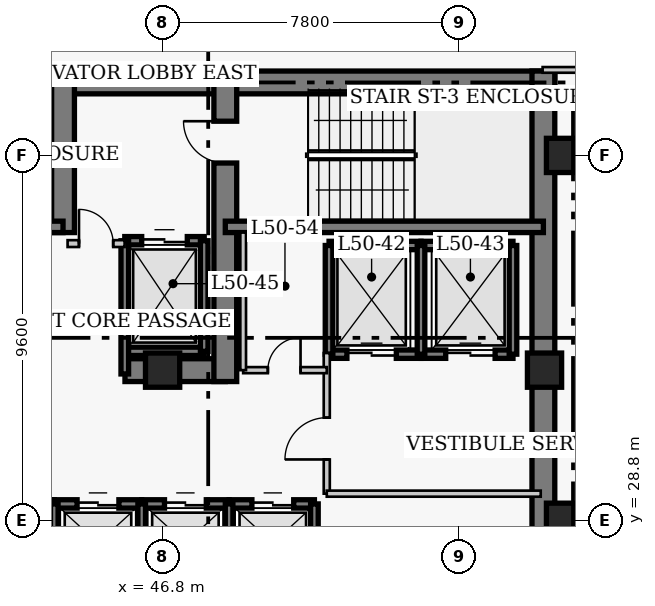
"""IFC4 building model, lengths in metres.
Left out: names, types, materials, properties, quantities, classifications, styles, units other than length and angle.
Written with IfcOpenShell. Run it as: python <this file> out.ifc"""

import sys

from ifc_helpers import new_model, si_unit, direction, frame, frame_2d, origin, origin_2d, place, context, subcontext, project, spatial, rectangle, extrude, element, fill, save


model = new_model("IFC4")
c1 = context("Model", 3, precision=1e-05, world=origin(), true_north=direction((0.0, 1.0)))
c2 = subcontext(c1, "Body", "Model", "MODEL_VIEW")
j1 = project(units=[si_unit("LENGTHUNIT", "METRE"), si_unit("PLANEANGLEUNIT", "RADIAN")], contexts=[c1])
p1 = place(None, origin())
s1 = spatial("IfcSite", under=j1, at=p1, CompositionType="ELEMENT")
p2 = place(p1, origin())
s2 = spatial("IfcBuilding", under=s1, at=p2, CompositionType="ELEMENT")
p3 = place(p2, frame((0.0, 0.0, 200.7)))
s3 = spatial("IfcBuildingStorey", under=s2, at=p3, CompositionType="ELEMENT", Elevation=200.7)
p4 = place(p3, frame((35.85, 40.32, 0.0), z_axis=(0.0, 0.0, 1.0), x_axis=(1.0, 0.0, 0.0)))
e1 = element("IfcWall", 1, at=p4, inside=s3, PredefinedType="SHEAR", context=c2, shape_type="SweptSolid", body=[
    extrude(rectangle(XDim=12.6, YDim=0.6, at=frame_2d((6.3, 0.0))), origin(), (0.0, 0.0, 1.0), 3.9),
])
p5 = place(p3, frame((48.45, 40.32, 0.0), z_axis=(0.0, 0.0, 1.0), x_axis=(1.0, 0.0, 0.0)))
e2 = element("IfcWall", 2, at=p5, inside=s3, PredefinedType="SHEAR", context=c2, shape_type="SweptSolid", body=[
    extrude(rectangle(XDim=8.67, YDim=0.6, at=frame_2d((4.335, 0.0))), origin(), (0.0, 0.0, 1.0), 3.9),
])
p6 = place(p3, frame((56.82, 27.05, 0.0), z_axis=(0.0, 0.0, 1.0), x_axis=(0.0, 1.0, 0.0)))
e3 = element("IfcWall", 3, at=p6, inside=s3, PredefinedType="SHEAR", context=c2, shape_type="SweptSolid", body=[
    extrude(rectangle(XDim=13.57, YDim=0.6, at=frame_2d((6.785, 0.0))), origin(), (0.0, 0.0, 1.0), 3.9),
])
p7 = place(p3, frame((45.81, 32.75, 0.0), z_axis=(0.0, 0.0, 1.0), x_axis=(1.0, 0.0, 0.0)))
e4 = element("IfcWall", 4, at=p7, inside=s3, PredefinedType="SHEAR", context=c2, shape_type="SweptSolid", body=[
    extrude(rectangle(XDim=2.64, YDim=0.6, at=frame_2d((1.32, 0.0))), origin(), (0.0, 0.0, 1.0), 3.9),
])
p8 = place(p3, frame((44.18, 36.37, 0.0), z_axis=(0.0, 0.0, 1.0), x_axis=(0.0, 1.0, 0.0)))
e5 = element("IfcWall", 5, at=p8, inside=s3, PredefinedType="SHEAR", context=c2, shape_type="SweptSolid", body=[
    extrude(rectangle(XDim=3.95, YDim=0.6, at=frame_2d((1.975, 0.0))), origin(), (0.0, 0.0, 1.0), 3.9),
])
p9 = place(p3, frame((48.45, 32.45, 0.0), z_axis=(0.0, 0.0, 1.0), x_axis=(0.0, 1.0, 0.0)))
e6 = element("IfcWall", 6, at=p9, inside=s3, PredefinedType="SHEAR", context=c2, shape_type="SweptSolid", body=[
    extrude(rectangle(XDim=7.87, YDim=0.6, at=frame_2d((3.935, 0.0))), origin(), (0.0, 0.0, 1.0), 3.9),
])
p10 = place(p9, frame((5.75, 0.0, 0.0)))
e7 = element("IfcOpeningElement", 7, at=p10, cuts=e6, PredefinedType="OPENING", context=c2, shape_type="SweptSolid", body=[
    extrude(rectangle(XDim=1.1, YDim=2.15, at=frame_2d((0.55, 1.075))), frame((0.0, 0.31, 0.0), z_axis=(0.0, -1.0, 0.0), x_axis=(1.0, 0.0, 0.0)), (0.0, 0.0, 1.0), 0.62),
])
p11 = place(p3, frame((35.85, 36.52, 0.0), z_axis=(0.0, 0.0, 1.0), x_axis=(1.0, 0.0, 0.0)))
e8 = element("IfcWall", 8, at=p11, inside=s3, PredefinedType="SHEAR", context=c2, shape_type="SweptSolid", body=[
    extrude(rectangle(XDim=8.33, YDim=0.3, at=frame_2d((4.165, 0.0))), origin(), (0.0, 0.0, 1.0), 3.9),
])
p12 = place(p3, frame((48.45, 36.52, 0.0), z_axis=(0.0, 0.0, 1.0), x_axis=(1.0, 0.0, 0.0)))
e9 = element("IfcWall", 9, at=p12, inside=s3, PredefinedType="SHEAR", context=c2, shape_type="SweptSolid", body=[
    extrude(rectangle(XDim=8.37, YDim=0.3, at=frame_2d((4.185, 0.0))), origin(), (0.0, 0.0, 1.0), 3.9),
])
for number, where, z_axis, x_axis in (
    (10, (57.35, 28.8, 0.0), (0.0, 0.0, 1.0), (1.0, 0.0, 0.0)),
    (11, (57.35, 38.4, 0.0), (0.0, 0.0, 1.0), (1.0, 0.0, 0.0)),
    (12, (46.8, 32.75, 0.0), (0.0, 0.0, 1.0), (1.0, 0.0, 0.0)),
    (13, (56.85, 32.75, 0.0), (0.0, 0.0, 1.0), (1.0, 0.0, 0.0)),
):
    element("IfcColumn", number, at=place(p3, frame(where, z_axis=z_axis, x_axis=x_axis)), inside=s3, PredefinedType="COLUMN", context=c2, shape_type="SweptSolid", body=[
        extrude(rectangle(XDim=0.9, YDim=0.9, at=origin_2d()), origin(), (0.0, 0.0, 1.0), 3.9),
    ])
p13 = place(p3, frame((41.705, 29.23, 0.0), z_axis=(0.0, 0.0, 1.0), x_axis=(1.0, 0.0, 0.0)))
e14 = element("IfcWall", 14, at=p13, inside=s3, PredefinedType="SHEAR", context=c2, shape_type="SweptSolid", body=[
    extrude(rectangle(XDim=2.245, YDim=0.22, at=frame_2d((1.123, 0.0))), origin(), (0.0, 0.0, 1.0), 3.9),
])
p14 = place(p13, frame((0.545, 0.0, 0.0)))
e15 = element("IfcOpeningElement", 15, at=p14, cuts=e14, PredefinedType="OPENING", context=c2, shape_type="SweptSolid", body=[
    extrude(rectangle(XDim=1.1, YDim=2.15, at=frame_2d((0.55, 1.075))), frame((0.0, 0.12, 0.0), z_axis=(0.0, -1.0, 0.0), x_axis=(1.0, 0.0, 0.0)), (0.0, 0.0, 1.0), 0.24),
])
p15 = place(p3, frame((43.95, 29.23, 0.0), z_axis=(0.0, 0.0, 1.0), x_axis=(1.0, 0.0, 0.0)))
e16 = element("IfcWall", 16, at=p15, inside=s3, PredefinedType="SHEAR", context=c2, shape_type="SweptSolid", body=[
    extrude(rectangle(XDim=2.3, YDim=0.22, at=frame_2d((1.15, 0.0))), origin(), (0.0, 0.0, 1.0), 3.9),
])
p16 = place(p15, frame((0.6, 0.0, 0.0)))
e17 = element("IfcOpeningElement", 17, at=p16, cuts=e16, PredefinedType="OPENING", context=c2, shape_type="SweptSolid", body=[
    extrude(rectangle(XDim=1.1, YDim=2.15, at=frame_2d((0.55, 1.075))), frame((0.0, 0.12, 0.0), z_axis=(0.0, -1.0, 0.0), x_axis=(1.0, 0.0, 0.0)), (0.0, 0.0, 1.0), 0.24),
])
p17 = place(p3, frame((43.95, 27.17, 0.0), z_axis=(0.0, 0.0, 1.0), x_axis=(0.0, 1.0, 0.0)))
e18 = element("IfcWall", 18, at=p17, inside=s3, PredefinedType="SHEAR", context=c2, shape_type="SweptSolid", body=[
    extrude(rectangle(XDim=2.06, YDim=0.2, at=frame_2d((1.03, 0.0))), origin(), (0.0, 0.0, 1.0), 3.9),
])
p18 = place(p3, frame((46.25, 29.23, 0.0), z_axis=(0.0, 0.0, 1.0), x_axis=(1.0, 0.0, 0.0)))
e19 = element("IfcWall", 19, at=p18, inside=s3, PredefinedType="SHEAR", context=c2, shape_type="SweptSolid", body=[
    extrude(rectangle(XDim=2.3, YDim=0.22, at=frame_2d((1.15, 0.0))), origin(), (0.0, 0.0, 1.0), 3.9),
])
p19 = place(p18, frame((0.6, 0.0, 0.0)))
e20 = element("IfcOpeningElement", 20, at=p19, cuts=e19, PredefinedType="OPENING", context=c2, shape_type="SweptSolid", body=[
    extrude(rectangle(XDim=1.1, YDim=2.15, at=frame_2d((0.55, 1.075))), frame((0.0, 0.12, 0.0), z_axis=(0.0, -1.0, 0.0), x_axis=(1.0, 0.0, 0.0)), (0.0, 0.0, 1.0), 0.24),
])
p20 = place(p3, frame((46.25, 27.17, 0.0), z_axis=(0.0, 0.0, 1.0), x_axis=(0.0, 1.0, 0.0)))
e21 = element("IfcWall", 21, at=p20, inside=s3, PredefinedType="SHEAR", context=c2, shape_type="SweptSolid", body=[
    extrude(rectangle(XDim=2.06, YDim=0.2, at=frame_2d((1.03, 0.0))), origin(), (0.0, 0.0, 1.0), 3.9),
])
p21 = place(p3, frame((48.55, 29.23, 0.0), z_axis=(0.0, 0.0, 1.0), x_axis=(1.0, 0.0, 0.0)))
e22 = element("IfcWall", 22, at=p21, inside=s3, PredefinedType="SHEAR", context=c2, shape_type="SweptSolid", body=[
    extrude(rectangle(XDim=2.245, YDim=0.22, at=frame_2d((1.123, 0.0))), origin(), (0.0, 0.0, 1.0), 3.9),
])
p22 = place(p21, frame((0.6, 0.0, 0.0)))
e23 = element("IfcOpeningElement", 23, at=p22, cuts=e22, PredefinedType="OPENING", context=c2, shape_type="SweptSolid", body=[
    extrude(rectangle(XDim=1.1, YDim=2.15, at=frame_2d((0.55, 1.075))), frame((0.0, 0.12, 0.0), z_axis=(0.0, -1.0, 0.0), x_axis=(1.0, 0.0, 0.0)), (0.0, 0.0, 1.0), 0.24),
])
for number, where, z_axis, x_axis in (
    (24, (48.55, 27.17, 0.0), (0.0, 0.0, 1.0), (0.0, 1.0, 0.0)),
    (25, (50.795, 27.17, 0.0), (0.0, 0.0, 1.0), (0.0, 1.0, 0.0)),
):
    element("IfcWall", number, at=place(p3, frame(where, z_axis=z_axis, x_axis=x_axis)), inside=s3, PredefinedType="SHEAR", context=c2, shape_type="SweptSolid", body=[
        extrude(rectangle(XDim=2.06, YDim=0.2, at=frame_2d((1.03, 0.0))), origin(), (0.0, 0.0, 1.0), 3.9),
    ])
p23 = place(p3, frame((51.18, 36.03, 0.0), z_axis=(0.0, 0.0, 1.0), x_axis=(1.0, 0.0, 0.0)))
e26 = element("IfcWall", 26, at=p23, inside=s3, PredefinedType="SHEAR", context=c2, shape_type="SweptSolid", body=[
    extrude(rectangle(XDim=2.42, YDim=0.22, at=frame_2d((1.21, 0.0))), origin(), (0.0, 0.0, 1.0), 3.9),
])
p24 = place(p3, frame((51.18, 33.17, 0.0), z_axis=(0.0, 0.0, 1.0), x_axis=(1.0, 0.0, 0.0)))
e27 = element("IfcWall", 27, at=p24, inside=s3, PredefinedType="SHEAR", context=c2, shape_type="SweptSolid", body=[
    extrude(rectangle(XDim=2.42, YDim=0.22, at=frame_2d((1.21, 0.0))), origin(), (0.0, 0.0, 1.0), 3.9),
])
p25 = place(p24, frame((0.47, 0.0, 0.0)))
e28 = element("IfcOpeningElement", 28, at=p25, cuts=e27, PredefinedType="OPENING", context=c2, shape_type="SweptSolid", body=[
    extrude(rectangle(XDim=1.3, YDim=2.15, at=frame_2d((0.65, 1.075))), frame((0.0, 0.12, 0.0), z_axis=(0.0, -1.0, 0.0), x_axis=(1.0, 0.0, 0.0)), (0.0, 0.0, 1.0), 0.24),
])
p26 = place(p3, frame((51.18, 33.17, 0.0), z_axis=(0.0, 0.0, 1.0), x_axis=(0.0, 1.0, 0.0)))
e29 = element("IfcWall", 29, at=p26, inside=s3, PredefinedType="SHEAR", context=c2, shape_type="SweptSolid", body=[
    extrude(rectangle(XDim=2.86, YDim=0.2, at=frame_2d((1.43, 0.0))), origin(), (0.0, 0.0, 1.0), 3.9),
])
p27 = place(p3, frame((53.6, 36.03, 0.0), z_axis=(0.0, 0.0, 1.0), x_axis=(1.0, 0.0, 0.0)))
e30 = element("IfcWall", 30, at=p27, inside=s3, PredefinedType="SHEAR", context=c2, shape_type="SweptSolid", body=[
    extrude(rectangle(XDim=2.42, YDim=0.22, at=frame_2d((1.21, 0.0))), origin(), (0.0, 0.0, 1.0), 3.9),
])
p28 = place(p3, frame((53.6, 33.17, 0.0), z_axis=(0.0, 0.0, 1.0), x_axis=(1.0, 0.0, 0.0)))
e31 = element("IfcWall", 31, at=p28, inside=s3, PredefinedType="SHEAR", context=c2, shape_type="SweptSolid", body=[
    extrude(rectangle(XDim=2.42, YDim=0.22, at=frame_2d((1.21, 0.0))), origin(), (0.0, 0.0, 1.0), 3.9),
])
p29 = place(p28, frame((0.65, 0.0, 0.0)))
e32 = element("IfcOpeningElement", 32, at=p29, cuts=e31, PredefinedType="OPENING", context=c2, shape_type="SweptSolid", body=[
    extrude(rectangle(XDim=1.3, YDim=2.15, at=frame_2d((0.65, 1.075))), frame((0.0, 0.12, 0.0), z_axis=(0.0, -1.0, 0.0), x_axis=(1.0, 0.0, 0.0)), (0.0, 0.0, 1.0), 0.24),
])
for number, where, z_axis, x_axis in (
    (33, (53.6, 33.17, 0.0), (0.0, 0.0, 1.0), (0.0, 1.0, 0.0)),
    (34, (56.02, 33.17, 0.0), (0.0, 0.0, 1.0), (0.0, 1.0, 0.0)),
):
    element("IfcWall", number, at=place(p3, frame(where, z_axis=z_axis, x_axis=x_axis)), inside=s3, PredefinedType="SHEAR", context=c2, shape_type="SweptSolid", body=[
        extrude(rectangle(XDim=2.86, YDim=0.2, at=frame_2d((1.43, 0.0))), origin(), (0.0, 0.0, 1.0), 3.9),
    ])
p30 = place(p3, frame((45.805, 36.155, 0.0), z_axis=(0.0, 0.0, 1.0), x_axis=(1.0, 0.0, 0.0)))
e35 = element("IfcWall", 35, at=p30, inside=s3, PredefinedType="SHEAR", context=c2, shape_type="SweptSolid", body=[
    extrude(rectangle(XDim=2.09, YDim=0.22, at=frame_2d((1.045, 0.0))), origin(), (0.0, 0.0, 1.0), 3.9),
])
p31 = place(p30, frame((0.445, 0.0, 0.0)))
e36 = element("IfcOpeningElement", 36, at=p31, cuts=e35, PredefinedType="OPENING", context=c2, shape_type="SweptSolid", body=[
    extrude(rectangle(XDim=1.2, YDim=2.15, at=frame_2d((0.6, 1.075))), frame((0.0, 0.12, 0.0), z_axis=(0.0, -1.0, 0.0), x_axis=(1.0, 0.0, 0.0)), (0.0, 0.0, 1.0), 0.24),
])
p32 = place(p3, frame((45.805, 33.245, 0.0), z_axis=(0.0, 0.0, 1.0), x_axis=(1.0, 0.0, 0.0)))
e37 = element("IfcWall", 37, at=p32, inside=s3, PredefinedType="SHEAR", context=c2, shape_type="SweptSolid", body=[
    extrude(rectangle(XDim=2.09, YDim=0.22, at=frame_2d((1.045, 0.0))), origin(), (0.0, 0.0, 1.0), 3.9),
])
p33 = place(p3, frame((45.805, 32.65, 0.0), z_axis=(0.0, 0.0, 1.0), x_axis=(0.0, 1.0, 0.0)))
e38 = element("IfcWall", 38, at=p33, inside=s3, PredefinedType="SHEAR", context=c2, shape_type="SweptSolid", body=[
    extrude(rectangle(XDim=3.505, YDim=0.2, at=frame_2d((1.752, 0.0))), origin(), (0.0, 0.0, 1.0), 3.9),
])
p34 = place(p3, frame((47.895, 33.245, 0.0), z_axis=(0.0, 0.0, 1.0), x_axis=(0.0, 1.0, 0.0)))
e39 = element("IfcWall", 39, at=p34, inside=s3, PredefinedType="SHEAR", context=c2, shape_type="SweptSolid", body=[
    extrude(rectangle(XDim=2.91, YDim=0.2, at=frame_2d((1.455, 0.0))), origin(), (0.0, 0.0, 1.0), 3.9),
])
p35 = place(p3, frame((44.3, 36.08, 0.0), z_axis=(0.0, 0.0, 1.0), x_axis=(1.0, 0.0, 0.0)))
e40 = element("IfcWall", 40, at=p35, inside=s3, PredefinedType="PARTITIONING", context=c2, shape_type="SweptSolid", body=[
    extrude(rectangle(XDim=1.5, YDim=0.18, at=frame_2d((0.75, 0.0))), origin(), (0.0, 0.0, 1.0), 3.65),
])
p36 = place(p35, frame((0.3, 0.0, 0.0)))
e41 = element("IfcOpeningElement", 41, at=p36, cuts=e40, PredefinedType="OPENING", context=c2, shape_type="SweptSolid", body=[
    extrude(rectangle(XDim=0.9, YDim=2.15, at=frame_2d((0.45, 1.075))), frame((0.0, 0.1, 0.0), z_axis=(0.0, -1.0, 0.0), x_axis=(1.0, 0.0, 0.0)), (0.0, 0.0, 1.0), 0.2),
])
p37 = place(p3, frame((51.12, 29.5, 0.0), z_axis=(0.0, 0.0, 1.0), x_axis=(0.0, 1.0, 0.0)))
e42 = element("IfcWall", 42, at=p37, inside=s3, PredefinedType="PARTITIONING", context=c2, shape_type="SweptSolid", body=[
    extrude(rectangle(XDim=3.7, YDim=0.16, at=frame_2d((1.85, 0.0))), origin(), (0.0, 0.0, 1.0), 3.65),
])
p38 = place(p37, frame((0.9, 0.0, 0.0)))
e43 = element("IfcOpeningElement", 43, at=p38, cuts=e42, PredefinedType="OPENING", context=c2, shape_type="SweptSolid", body=[
    extrude(rectangle(XDim=1.1, YDim=2.15, at=frame_2d((0.55, 1.075))), frame((0.0, 0.09, 0.0), z_axis=(0.0, -1.0, 0.0), x_axis=(1.0, 0.0, 0.0)), (0.0, 0.0, 1.0), 0.18),
])
p39 = place(p3, frame((51.12, 29.5, 0.0), z_axis=(0.0, 0.0, 1.0), x_axis=(1.0, 0.0, 0.0)))
e44 = element("IfcWall", 44, at=p39, inside=s3, PredefinedType="PARTITIONING", context=c2, shape_type="SweptSolid", body=[
    extrude(rectangle(XDim=5.63, YDim=0.16, at=frame_2d((2.815, 0.0))), origin(), (0.0, 0.0, 1.0), 3.65),
])
p40 = place(p3, frame((48.92, 32.75, 0.0), z_axis=(0.0, 0.0, 1.0), x_axis=(1.0, 0.0, 0.0)))
e45 = element("IfcWall", 45, at=p40, inside=s3, PredefinedType="PARTITIONING", context=c2, shape_type="SweptSolid", body=[
    extrude(rectangle(XDim=2.2, YDim=0.16, at=frame_2d((1.1, 0.0))), origin(), (0.0, 0.0, 1.0), 3.65),
])
p41 = place(p40, frame((0.65, 0.0, 0.0)))
e46 = element("IfcOpeningElement", 46, at=p41, cuts=e45, PredefinedType="OPENING", context=c2, shape_type="SweptSolid", body=[
    extrude(rectangle(XDim=0.86, YDim=2.05, at=frame_2d((0.43, 1.025))), frame((0.0, 0.09, 0.0), z_axis=(0.0, -1.0, 0.0), x_axis=(1.0, 0.0, 0.0)), (0.0, 0.0, 1.0), 0.18),
])
p42 = place(p3, frame((48.92, 32.75, 0.0), z_axis=(0.0, 0.0, 1.0), x_axis=(0.0, 1.0, 0.0)))
e47 = element("IfcWall", 47, at=p42, inside=s3, PredefinedType="PARTITIONING", context=c2, shape_type="SweptSolid", body=[
    extrude(rectangle(XDim=3.62, YDim=0.15, at=frame_2d((1.81, 0.0))), origin(), (0.0, 0.0, 1.0), 3.65),
])
p43 = place(p3, frame((56.8, 40.65, 0.0), z_axis=(0.0, 0.0, 1.0), x_axis=(1.0, 0.0, 0.0)))
e48 = element("IfcWall", 48, at=p43, inside=s3, PredefinedType="PARTITIONING", context=c2, shape_type="SweptSolid", body=[
    extrude(rectangle(XDim=3.66, YDim=0.15, at=frame_2d((1.83, 0.0))), origin(), (0.0, 0.0, 1.0), 3.65),
])
p44 = place(p43, frame((2.05, 0.0, 0.0)))
e49 = element("IfcOpeningElement", 49, at=p44, cuts=e48, PredefinedType="OPENING", context=c2, shape_type="SweptSolid", body=[
    extrude(rectangle(XDim=1.0, YDim=2.15, at=frame_2d((0.5, 1.075))), frame((0.0, 0.085, 0.0), z_axis=(0.0, -1.0, 0.0), x_axis=(1.0, 0.0, 0.0)), (0.0, 0.0, 1.0), 0.17),
])
p45 = place(p16, origin())
e50 = element("IfcDoor", 50, at=p45, inside=s3, OperationType="DOUBLE_DOOR_SLIDING", PredefinedType="DOOR", context=c2, shape_type="SweptSolid", body=[
    extrude(rectangle(XDim=1.1, YDim=2.15, at=frame_2d((0.55, 1.075))), frame((0.0, 0.025, 0.0), z_axis=(0.0, -1.0, 0.0), x_axis=(1.0, 0.0, 0.0)), (0.0, 0.0, 1.0), 0.05),
])
fill(e17, e50)
p46 = place(p19, origin())
e51 = element("IfcDoor", 51, at=p46, inside=s3, OperationType="DOUBLE_DOOR_SLIDING", PredefinedType="DOOR", context=c2, shape_type="SweptSolid", body=[
    extrude(rectangle(XDim=1.1, YDim=2.15, at=frame_2d((0.55, 1.075))), frame((0.0, 0.025, 0.0), z_axis=(0.0, -1.0, 0.0), x_axis=(1.0, 0.0, 0.0)), (0.0, 0.0, 1.0), 0.05),
])
fill(e20, e51)
p47 = place(p22, origin())
e52 = element("IfcDoor", 52, at=p47, inside=s3, OperationType="DOUBLE_DOOR_SLIDING", PredefinedType="DOOR", context=c2, shape_type="SweptSolid", body=[
    extrude(rectangle(XDim=1.1, YDim=2.15, at=frame_2d((0.55, 1.075))), frame((0.0, 0.025, 0.0), z_axis=(0.0, -1.0, 0.0), x_axis=(1.0, 0.0, 0.0)), (0.0, 0.0, 1.0), 0.05),
])
fill(e23, e52)
p48 = place(p25, origin())
e53 = element("IfcDoor", 53, at=p48, inside=s3, OperationType="DOUBLE_DOOR_SLIDING", PredefinedType="DOOR", context=c2, shape_type="SweptSolid", body=[
    extrude(rectangle(XDim=1.3, YDim=2.15, at=frame_2d((0.65, 1.075))), frame((0.0, 0.025, 0.0), z_axis=(0.0, -1.0, 0.0), x_axis=(1.0, 0.0, 0.0)), (0.0, 0.0, 1.0), 0.05),
])
fill(e28, e53)
p49 = place(p29, origin())
e54 = element("IfcDoor", 54, at=p49, inside=s3, OperationType="DOUBLE_DOOR_SLIDING", PredefinedType="DOOR", context=c2, shape_type="SweptSolid", body=[
    extrude(rectangle(XDim=1.3, YDim=2.15, at=frame_2d((0.65, 1.075))), frame((0.0, 0.025, 0.0), z_axis=(0.0, -1.0, 0.0), x_axis=(1.0, 0.0, 0.0)), (0.0, 0.0, 1.0), 0.05),
])
fill(e32, e54)
p50 = place(p31, origin())
e55 = element("IfcDoor", 55, at=p50, inside=s3, OperationType="DOUBLE_DOOR_SLIDING", PredefinedType="DOOR", context=c2, shape_type="SweptSolid", body=[
    extrude(rectangle(XDim=1.2, YDim=2.15, at=frame_2d((0.6, 1.075))), frame((0.0, 0.025, 0.0), z_axis=(0.0, -1.0, 0.0), x_axis=(1.0, 0.0, 0.0)), (0.0, 0.0, 1.0), 0.05),
])
fill(e36, e55)
p51 = place(p36, origin())
e56 = element("IfcDoor", 56, at=p51, inside=s3, OperationType="SINGLE_SWING_LEFT", PredefinedType="DOOR", context=c2, shape_type="SweptSolid", body=[
    extrude(rectangle(XDim=0.9, YDim=2.15, at=frame_2d((0.45, 1.075))), frame((0.0, 0.025, 0.0), z_axis=(0.0, -1.0, 0.0), x_axis=(1.0, 0.0, 0.0)), (0.0, 0.0, 1.0), 0.05),
])
fill(e41, e56)
p52 = place(p38, origin())
e57 = element("IfcDoor", 57, at=p52, inside=s3, OperationType="SINGLE_SWING_LEFT", PredefinedType="DOOR", context=c2, shape_type="SweptSolid", body=[
    extrude(rectangle(XDim=1.1, YDim=2.15, at=frame_2d((0.55, 1.075))), frame((0.0, 0.025, 0.0), z_axis=(0.0, -1.0, 0.0), x_axis=(1.0, 0.0, 0.0)), (0.0, 0.0, 1.0), 0.05),
])
fill(e43, e57)
p53 = place(p41, origin())
e58 = element("IfcDoor", 58, at=p53, inside=s3, OperationType="SINGLE_SWING_RIGHT", PredefinedType="DOOR", context=c2, shape_type="SweptSolid", body=[
    extrude(rectangle(XDim=0.86, YDim=2.05, at=frame_2d((0.43, 1.025))), frame((0.0, 0.025, 0.0), z_axis=(0.0, -1.0, 0.0), x_axis=(1.0, 0.0, 0.0)), (0.0, 0.0, 1.0), 0.05),
])
fill(e46, e58)
p54 = place(p10, origin())
e59 = element("IfcDoor", 59, at=p54, inside=s3, OperationType="SINGLE_SWING_RIGHT", PredefinedType="DOOR", context=c2, shape_type="SweptSolid", body=[
    extrude(rectangle(XDim=1.1, YDim=2.15, at=frame_2d((0.55, 1.075))), frame((0.0, 0.025, 0.0), z_axis=(0.0, -1.0, 0.0), x_axis=(1.0, 0.0, 0.0)), (0.0, 0.0, 1.0), 0.05),
])
fill(e7, e59)
save(model, sys.argv[1])
